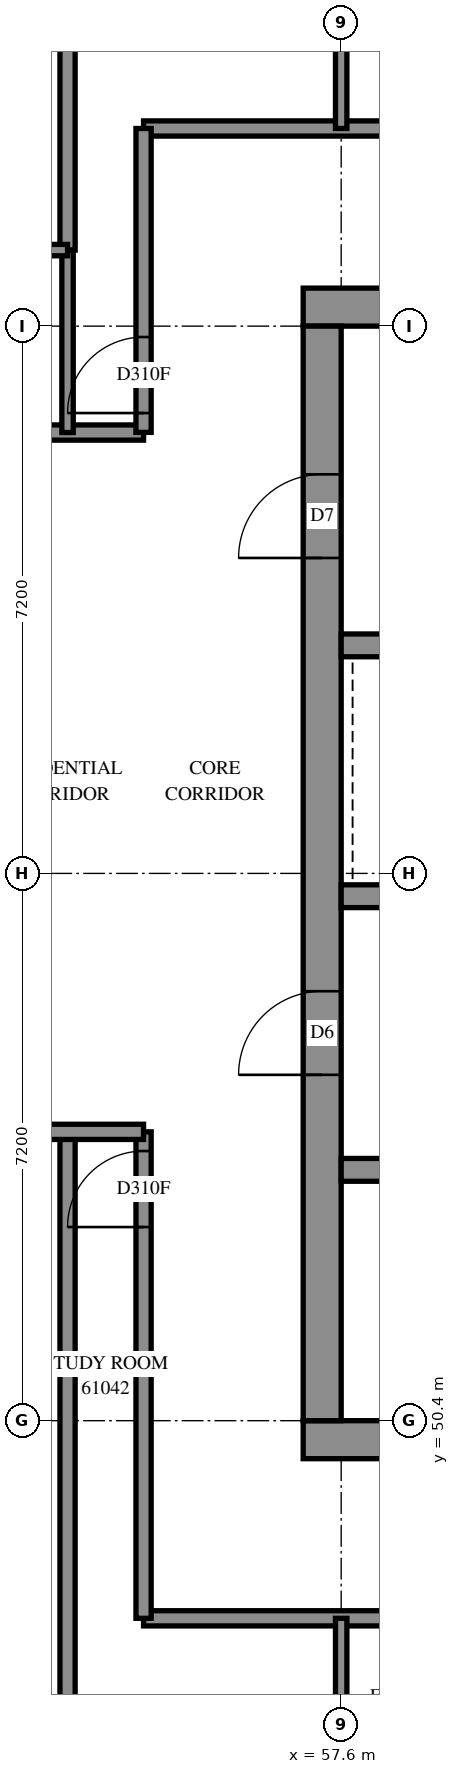
"""IFC4 building model, lengths in metres.
Left out: names, types, materials, properties, quantities, classifications, styles, units other than length and angle.
Written with IfcOpenShell. Run it as: python <this file> out.ifc"""

import sys

from ifc_helpers import new_model, si_unit, direction, frame, frame_2d, origin, place, context, subcontext, project, spatial, rectangle, extrude, element, fill, save


model = new_model("IFC4")
c1 = context("Model", 3, precision=1e-05, world=origin(), true_north=direction((0.0, 1.0)))
c2 = subcontext(c1, "Body", "Model", "MODEL_VIEW")
j1 = project(units=[si_unit("LENGTHUNIT", "METRE"), si_unit("PLANEANGLEUNIT", "RADIAN")], contexts=[c1])
p1 = place(None, origin())
s1 = spatial("IfcSite", under=j1, at=p1, CompositionType="ELEMENT")
p2 = place(p1, origin())
s2 = spatial("IfcBuilding", under=s1, at=p2, CompositionType="ELEMENT")
p3 = place(p2, frame((0.0, 0.0, 223.6)))
s3 = spatial("IfcBuildingStorey", under=s2, at=p3, CompositionType="ELEMENT", Elevation=223.6)
p4 = place(p3, frame((57.1, 50.15, -0.3), z_axis=(0.0, 0.0, 1.0), x_axis=(1.0, 0.0, 0.0)))
e1 = element("IfcWall", 1, at=p4, inside=s3, PredefinedType="SHEAR", context=c2, shape_type="SweptSolid", body=[
    extrude(rectangle(XDim=15.4, YDim=0.5, at=frame_2d((7.7, 0.0))), origin(), (0.0, 0.0, 1.0), 2.7),
])
p5 = place(p3, frame((57.1, 65.05, -0.3), z_axis=(0.0, 0.0, 1.0), x_axis=(1.0, 0.0, 0.0)))
e2 = element("IfcWall", 2, at=p5, inside=s3, PredefinedType="SHEAR", context=c2, shape_type="SweptSolid", body=[
    extrude(rectangle(XDim=15.4, YDim=0.5, at=frame_2d((7.7, 0.0))), origin(), (0.0, 0.0, 1.0), 2.7),
])
p6 = place(p5, frame((10.5, 0.0, 0.3)))
e3 = element("IfcOpeningElement", 3, at=p6, cuts=e2, PredefinedType="OPENING", context=c2, shape_type="SweptSolid", body=[
    extrude(rectangle(XDim=0.8, YDim=2.1, at=frame_2d((0.4, 1.05))), frame((0.0, 0.26, 0.0), z_axis=(0.0, -1.0, 0.0), x_axis=(1.0, 0.0, 0.0)), (0.0, 0.0, 1.0), 0.52),
])
p7 = place(p3, frame((57.35, 50.4, -0.3), z_axis=(0.0, 0.0, 1.0), x_axis=(0.0, 1.0, 0.0)))
e4 = element("IfcWall", 4, at=p7, inside=s3, PredefinedType="SHEAR", context=c2, shape_type="SweptSolid", body=[
    extrude(rectangle(XDim=14.4, YDim=0.5, at=frame_2d((7.2, 0.0))), origin(), (0.0, 0.0, 1.0), 2.7),
])
p8 = place(p7, frame((4.55, 0.0, 0.3)))
e5 = element("IfcOpeningElement", 5, at=p8, cuts=e4, PredefinedType="OPENING", context=c2, shape_type="SweptSolid", body=[
    extrude(rectangle(XDim=1.1, YDim=2.1, at=frame_2d((0.55, 1.05))), frame((0.0, 0.26, 0.0), z_axis=(0.0, -1.0, 0.0), x_axis=(1.0, 0.0, 0.0)), (0.0, 0.0, 1.0), 0.52),
])
p9 = place(p7, frame((11.35, 0.0, 0.3)))
e6 = element("IfcOpeningElement", 6, at=p9, cuts=e4, PredefinedType="OPENING", context=c2, shape_type="SweptSolid", body=[
    extrude(rectangle(XDim=1.1, YDim=2.1, at=frame_2d((0.55, 1.05))), frame((0.0, 0.26, 0.0), z_axis=(0.0, -1.0, 0.0), x_axis=(1.0, 0.0, 0.0)), (0.0, 0.0, 1.0), 0.52),
])
p10 = place(p3, frame((57.6, 53.7, 0.0), z_axis=(0.0, 0.0, 1.0), x_axis=(1.0, 0.0, 0.0)))
e7 = element("IfcWall", 7, at=p10, inside=s3, PredefinedType="SOLIDWALL", context=c2, shape_type="SweptSolid", body=[
    extrude(rectangle(XDim=14.4, YDim=0.3, at=frame_2d((7.2, 0.0))), origin(), (0.0, 0.0, 1.0), 3.1),
])
p11 = place(p10, frame((1.35, 0.0, 0.0)))
e8 = element("IfcOpeningElement", 8, at=p11, cuts=e7, PredefinedType="OPENING", context=c2, shape_type="SweptSolid", body=[
    extrude(rectangle(XDim=0.9, YDim=2.1, at=frame_2d((0.45, 1.05))), frame((0.0, 0.16, 0.0), z_axis=(0.0, -1.0, 0.0), x_axis=(1.0, 0.0, 0.0)), (0.0, 0.0, 1.0), 0.32),
])
p12 = place(p10, frame((4.95, 0.0, 0.0)))
e9 = element("IfcOpeningElement", 9, at=p12, cuts=e7, PredefinedType="OPENING", context=c2, shape_type="SweptSolid", body=[
    extrude(rectangle(XDim=0.9, YDim=2.1, at=frame_2d((0.45, 1.05))), frame((0.0, 0.16, 0.0), z_axis=(0.0, -1.0, 0.0), x_axis=(1.0, 0.0, 0.0)), (0.0, 0.0, 1.0), 0.32),
])
p13 = place(p10, frame((8.55, 0.0, 0.0)))
e10 = element("IfcOpeningElement", 10, at=p13, cuts=e7, PredefinedType="OPENING", context=c2, shape_type="SweptSolid", body=[
    extrude(rectangle(XDim=0.9, YDim=2.1, at=frame_2d((0.45, 1.05))), frame((0.0, 0.16, 0.0), z_axis=(0.0, -1.0, 0.0), x_axis=(1.0, 0.0, 0.0)), (0.0, 0.0, 1.0), 0.32),
])
p14 = place(p10, frame((12.05, 0.0, 0.0)))
e11 = element("IfcOpeningElement", 11, at=p14, cuts=e7, PredefinedType="OPENING", context=c2, shape_type="SweptSolid", body=[
    extrude(rectangle(XDim=1.1, YDim=2.1, at=frame_2d((0.55, 1.05))), frame((0.0, 0.16, 0.0), z_axis=(0.0, -1.0, 0.0), x_axis=(1.0, 0.0, 0.0)), (0.0, 0.0, 1.0), 0.32),
])
p15 = place(p3, frame((57.6, 57.3, 0.0), z_axis=(0.0, 0.0, 1.0), x_axis=(1.0, 0.0, 0.0)))
e12 = element("IfcWall", 12, at=p15, inside=s3, PredefinedType="SOLIDWALL", context=c2, shape_type="SweptSolid", body=[
    extrude(rectangle(XDim=14.4, YDim=0.3, at=frame_2d((7.2, 0.0))), origin(), (0.0, 0.0, 1.0), 3.1),
])
p16 = place(p15, frame((1.25, 0.0, 0.0)))
e13 = element("IfcOpeningElement", 13, at=p16, cuts=e12, PredefinedType="OPENING", context=c2, shape_type="SweptSolid", body=[
    extrude(rectangle(XDim=1.1, YDim=2.1, at=frame_2d((0.55, 1.05))), frame((0.0, 0.16, 0.0), z_axis=(0.0, -1.0, 0.0), x_axis=(1.0, 0.0, 0.0)), (0.0, 0.0, 1.0), 0.32),
])
p17 = place(p15, frame((4.85, 0.0, 0.0)))
e14 = element("IfcOpeningElement", 14, at=p17, cuts=e12, PredefinedType="OPENING", context=c2, shape_type="SweptSolid", body=[
    extrude(rectangle(XDim=1.1, YDim=2.1, at=frame_2d((0.55, 1.05))), frame((0.0, 0.16, 0.0), z_axis=(0.0, -1.0, 0.0), x_axis=(1.0, 0.0, 0.0)), (0.0, 0.0, 1.0), 0.32),
])
p18 = place(p15, frame((8.45, 0.0, 0.0)))
e15 = element("IfcOpeningElement", 15, at=p18, cuts=e12, PredefinedType="OPENING", context=c2, shape_type="SweptSolid", body=[
    extrude(rectangle(XDim=1.1, YDim=2.1, at=frame_2d((0.55, 1.05))), frame((0.0, 0.16, 0.0), z_axis=(0.0, -1.0, 0.0), x_axis=(1.0, 0.0, 0.0)), (0.0, 0.0, 1.0), 0.32),
])
p19 = place(p15, frame((12.05, 0.0, 0.0)))
e16 = element("IfcOpeningElement", 16, at=p19, cuts=e12, PredefinedType="OPENING", context=c2, shape_type="SweptSolid", body=[
    extrude(rectangle(XDim=1.1, YDim=2.1, at=frame_2d((0.55, 1.05))), frame((0.0, 0.16, 0.0), z_axis=(0.0, -1.0, 0.0), x_axis=(1.0, 0.0, 0.0)), (0.0, 0.0, 1.0), 0.32),
])
p20 = place(p3, frame((57.6, 60.6, 0.0), z_axis=(0.0, 0.0, 1.0), x_axis=(1.0, 0.0, 0.0)))
e17 = element("IfcWall", 17, at=p20, inside=s3, PredefinedType="SOLIDWALL", context=c2, shape_type="SweptSolid", body=[
    extrude(rectangle(XDim=7.2, YDim=0.3, at=frame_2d((3.6, 0.0))), origin(), (0.0, 0.0, 1.0), 3.1),
])
p21 = place(p3, frame((55.0, 67.4, 0.0), z_axis=(0.0, 0.0, 1.0), x_axis=(1.0, 0.0, 0.0)))
e18 = element("IfcWall", 18, at=p21, inside=s3, PredefinedType="PARTITIONING", context=c2, shape_type="SweptSolid", body=[
    extrude(rectangle(XDim=19.6, YDim=0.2, at=frame_2d((9.8, 0.0))), origin(), (0.0, 0.0, 1.0), 3.1),
])
p22 = place(p21, frame((4.9, 0.0, 0.0)))
e19 = element("IfcOpeningElement", 19, at=p22, cuts=e18, PredefinedType="OPENING", context=c2, shape_type="SweptSolid", body=[
    extrude(rectangle(XDim=0.9, YDim=2.1, at=frame_2d((0.45, 1.05))), frame((0.0, 0.11, 0.0), z_axis=(0.0, -1.0, 0.0), x_axis=(1.0, 0.0, 0.0)), (0.0, 0.0, 1.0), 0.22),
])
p23 = place(p21, frame((6.6, 0.0, 0.0)))
e20 = element("IfcOpeningElement", 20, at=p23, cuts=e18, PredefinedType="OPENING", context=c2, shape_type="SweptSolid", body=[
    extrude(rectangle(XDim=0.9, YDim=2.1, at=frame_2d((0.45, 1.05))), frame((0.0, 0.11, 0.0), z_axis=(0.0, -1.0, 0.0), x_axis=(1.0, 0.0, 0.0)), (0.0, 0.0, 1.0), 0.22),
])
p24 = place(p21, frame((14.001, 0.0, 0.0)))
e21 = element("IfcOpeningElement", 21, at=p24, cuts=e18, PredefinedType="OPENING", context=c2, shape_type="SweptSolid", body=[
    extrude(rectangle(XDim=0.9, YDim=2.1, at=frame_2d((0.45, 1.05))), frame((0.0, 0.11, 0.0), z_axis=(0.0, -1.0, 0.0), x_axis=(1.0, 0.0, 0.0)), (0.0, 0.0, 1.0), 0.22),
])
p25 = place(p3, frame((55.0, 47.8, 0.0), z_axis=(0.0, 0.0, 1.0), x_axis=(1.0, 0.0, 0.0)))
e22 = element("IfcWall", 22, at=p25, inside=s3, PredefinedType="PARTITIONING", context=c2, shape_type="SweptSolid", body=[
    extrude(rectangle(XDim=19.266, YDim=0.2, at=frame_2d((9.633, 0.0))), origin(), (0.0, 0.0, 1.0), 3.1),
])
p26 = place(p25, frame((4.9, 0.0, 0.0)))
e23 = element("IfcOpeningElement", 23, at=p26, cuts=e22, PredefinedType="OPENING", context=c2, shape_type="SweptSolid", body=[
    extrude(rectangle(XDim=0.9, YDim=2.1, at=frame_2d((0.45, 1.05))), frame((0.0, 0.11, 0.0), z_axis=(0.0, -1.0, 0.0), x_axis=(1.0, 0.0, 0.0)), (0.0, 0.0, 1.0), 0.22),
])
p27 = place(p25, frame((6.6, 0.0, 0.0)))
e24 = element("IfcOpeningElement", 24, at=p27, cuts=e22, PredefinedType="OPENING", context=c2, shape_type="SweptSolid", body=[
    extrude(rectangle(XDim=0.9, YDim=2.1, at=frame_2d((0.45, 1.05))), frame((0.0, 0.11, 0.0), z_axis=(0.0, -1.0, 0.0), x_axis=(1.0, 0.0, 0.0)), (0.0, 0.0, 1.0), 0.22),
])
p28 = place(p25, frame((13.661, 0.0, 0.0)))
e25 = element("IfcOpeningElement", 25, at=p28, cuts=e22, PredefinedType="OPENING", context=c2, shape_type="SweptSolid", body=[
    extrude(rectangle(XDim=0.9, YDim=2.1, at=frame_2d((0.45, 1.05))), frame((0.0, 0.11, 0.0), z_axis=(0.0, -1.0, 0.0), x_axis=(1.0, 0.0, 0.0)), (0.0, 0.0, 1.0), 0.22),
])
p29 = place(p3, frame((40.602, 63.4, 0.0), z_axis=(0.0, 0.0, 1.0), x_axis=(1.0, 0.0, 0.0)))
e26 = element("IfcWall", 26, at=p29, inside=s3, PredefinedType="PARTITIONING", context=c2, shape_type="SweptSolid", body=[
    extrude(rectangle(XDim=14.398, YDim=0.2, at=frame_2d((7.199, 0.0))), origin(), (0.0, 0.0, 1.0), 3.1),
])
p30 = place(p29, frame((2.998, 0.0, 0.0)))
e27 = element("IfcOpeningElement", 27, at=p30, cuts=e26, PredefinedType="OPENING", context=c2, shape_type="SweptSolid", body=[
    extrude(rectangle(XDim=0.9, YDim=2.1, at=frame_2d((0.45, 1.05))), frame((0.0, 0.11, 0.0), z_axis=(0.0, -1.0, 0.0), x_axis=(1.0, 0.0, 0.0)), (0.0, 0.0, 1.0), 0.22),
])
p31 = place(p29, frame((8.498, 0.0, 0.0)))
e28 = element("IfcOpeningElement", 28, at=p31, cuts=e26, PredefinedType="OPENING", context=c2, shape_type="SweptSolid", body=[
    extrude(rectangle(XDim=0.9, YDim=2.1, at=frame_2d((0.45, 1.05))), frame((0.0, 0.11, 0.0), z_axis=(0.0, -1.0, 0.0), x_axis=(1.0, 0.0, 0.0)), (0.0, 0.0, 1.0), 0.22),
])
p32 = place(p29, frame((10.198, 0.0, 0.0)))
e29 = element("IfcOpeningElement", 29, at=p32, cuts=e26, PredefinedType="OPENING", context=c2, shape_type="SweptSolid", body=[
    extrude(rectangle(XDim=0.9, YDim=2.1, at=frame_2d((0.45, 1.05))), frame((0.0, 0.11, 0.0), z_axis=(0.0, -1.0, 0.0), x_axis=(1.0, 0.0, 0.0)), (0.0, 0.0, 1.0), 0.22),
])
p33 = place(p3, frame((54.0, 42.31, 0.0), z_axis=(0.0, 0.0, 1.0), x_axis=(0.0, 1.0, 0.0)))
e30 = element("IfcWall", 30, at=p33, inside=s3, PredefinedType="PARTITIONING", context=c2, shape_type="SweptSolid", body=[
    extrude(rectangle(XDim=11.89, YDim=0.2, at=frame_2d((5.945, 0.0))), origin(), (0.0, 0.0, 1.0), 3.1),
])
p34 = place(p3, frame((54.0, 65.8, 0.0), z_axis=(0.0, 0.0, 1.0), x_axis=(0.0, 1.0, 0.0)))
e31 = element("IfcWall", 31, at=p34, inside=s3, PredefinedType="PARTITIONING", context=c2, shape_type="SweptSolid", body=[
    extrude(rectangle(XDim=7.004, YDim=0.2, at=frame_2d((3.502, 0.0))), origin(), (0.0, 0.0, 1.0), 3.1),
])
p35 = place(p3, frame((55.0, 47.8, 0.0), z_axis=(0.0, 0.0, 1.0), x_axis=(0.0, 1.0, 0.0)))
e32 = element("IfcWall", 32, at=p35, inside=s3, PredefinedType="PARTITIONING", context=c2, shape_type="SweptSolid", body=[
    extrude(rectangle(XDim=6.4, YDim=0.2, at=frame_2d((3.2, 0.0))), origin(), (0.0, 0.0, 1.0), 3.1),
])
p36 = place(p35, frame((5.147, 0.0, 0.0)))
e33 = element("IfcOpeningElement", 33, at=p36, cuts=e32, PredefinedType="OPENING", context=c2, shape_type="SweptSolid", body=[
    extrude(rectangle(XDim=1.0, YDim=2.1, at=frame_2d((0.5, 1.05))), frame((0.0, 0.11, 0.0), z_axis=(0.0, -1.0, 0.0), x_axis=(1.0, 0.0, 0.0)), (0.0, 0.0, 1.0), 0.22),
])
p37 = place(p3, frame((50.4, 54.2, 0.0), z_axis=(0.0, 0.0, 1.0), x_axis=(1.0, 0.0, 0.0)))
e34 = element("IfcWall", 34, at=p37, inside=s3, PredefinedType="PARTITIONING", context=c2, shape_type="SweptSolid", body=[
    extrude(rectangle(XDim=4.6, YDim=0.2, at=frame_2d((2.3, 0.0))), origin(), (0.0, 0.0, 1.0), 3.1),
])
p38 = place(p37, frame((2.3, 0.0, 0.0)))
e35 = element("IfcOpeningElement", 35, at=p38, cuts=e34, PredefinedType="OPENING", context=c2, shape_type="SweptSolid", body=[
    extrude(rectangle(XDim=0.9, YDim=2.1, at=frame_2d((0.45, 1.05))), frame((0.0, 0.11, 0.0), z_axis=(0.0, -1.0, 0.0), x_axis=(1.0, 0.0, 0.0)), (0.0, 0.0, 1.0), 0.22),
])
p39 = place(p3, frame((55.0, 63.402, 0.0), z_axis=(0.0, 0.0, 1.0), x_axis=(0.0, 1.0, 0.0)))
e36 = element("IfcWall", 36, at=p39, inside=s3, PredefinedType="PARTITIONING", context=c2, shape_type="SweptSolid", body=[
    extrude(rectangle(XDim=3.998, YDim=0.2, at=frame_2d((1.999, 0.0))), origin(), (0.0, 0.0, 1.0), 3.1),
])
p40 = place(p39, frame((0.255, 0.0, 0.0)))
e37 = element("IfcOpeningElement", 37, at=p40, cuts=e36, PredefinedType="OPENING", context=c2, shape_type="SweptSolid", body=[
    extrude(rectangle(XDim=1.0, YDim=2.1, at=frame_2d((0.5, 1.05))), frame((0.0, 0.11, 0.0), z_axis=(0.0, -1.0, 0.0), x_axis=(1.0, 0.0, 0.0)), (0.0, 0.0, 1.0), 0.22),
])
for number, where, z_axis, x_axis in (
    (38, (54.0, 63.4, 0.0), (0.0, 0.0, 1.0), (0.0, 1.0, 0.0)),
    (39, (57.6, 45.4, 0.0), (0.0, 0.0, 1.0), (0.0, 1.0, 0.0)),
    (40, (57.6, 67.4, 0.0), (0.0, 0.0, 1.0), (0.0, 1.0, 0.0)),
):
    element("IfcWall", number, at=place(p3, frame(where, z_axis=z_axis, x_axis=x_axis)), inside=s3, PredefinedType="PARTITIONING", context=c2, shape_type="SweptSolid", body=[
        extrude(rectangle(XDim=2.4, YDim=0.15, at=frame_2d((1.2, 0.0))), origin(), (0.0, 0.0, 1.0), 3.1),
    ])
p41 = place(p3, frame((52.1, 65.8, 0.0), z_axis=(0.0, 0.0, 1.0), x_axis=(1.0, 0.0, 0.0)))
e41 = element("IfcWall", 41, at=p41, inside=s3, PredefinedType="PARTITIONING", context=c2, shape_type="SweptSolid", body=[
    extrude(rectangle(XDim=1.9, YDim=0.15, at=frame_2d((0.95, 0.0))), origin(), (0.0, 0.0, 1.0), 3.1),
])
p42 = place(p41, frame((0.493, 0.0, 0.0)))
e42 = element("IfcOpeningElement", 42, at=p42, cuts=e41, PredefinedType="OPENING", context=c2, shape_type="SweptSolid", body=[
    extrude(rectangle(XDim=0.8, YDim=2.1, at=frame_2d((0.4, 1.05))), frame((0.0, 0.085, 0.0), z_axis=(0.0, -1.0, 0.0), x_axis=(1.0, 0.0, 0.0)), (0.0, 0.0, 1.0), 0.17),
])
p43 = place(p8, origin())
e43 = element("IfcDoor", 43, at=p43, inside=s3, OperationType="DOUBLE_DOOR_SINGLE_SWING", PredefinedType="DOOR", context=c2, shape_type="SweptSolid", body=[
    extrude(rectangle(XDim=1.1, YDim=2.1, at=frame_2d((0.55, 1.05))), frame((0.0, 0.025, 0.0), z_axis=(0.0, -1.0, 0.0), x_axis=(1.0, 0.0, 0.0)), (0.0, 0.0, 1.0), 0.05),
])
fill(e5, e43)
p44 = place(p9, origin())
e44 = element("IfcDoor", 44, at=p44, inside=s3, OperationType="SINGLE_SWING_LEFT", PredefinedType="DOOR", context=c2, shape_type="SweptSolid", body=[
    extrude(rectangle(XDim=1.1, YDim=2.1, at=frame_2d((0.55, 1.05))), frame((0.0, 0.025, 0.0), z_axis=(0.0, -1.0, 0.0), x_axis=(1.0, 0.0, 0.0)), (0.0, 0.0, 1.0), 0.05),
])
fill(e6, e44)
p45 = place(p40, origin())
e45 = element("IfcDoor", 45, at=p45, inside=s3, OperationType="SINGLE_SWING_LEFT", PredefinedType="DOOR", context=c2, shape_type="SweptSolid", body=[
    extrude(rectangle(XDim=1.0, YDim=2.1, at=frame_2d((0.5, 1.05))), frame((0.0, 0.025, 0.0), z_axis=(0.0, -1.0, 0.0), x_axis=(1.0, 0.0, 0.0)), (0.0, 0.0, 1.0), 0.05),
])
fill(e37, e45)
p46 = place(p36, origin())
e46 = element("IfcDoor", 46, at=p46, inside=s3, OperationType="SINGLE_SWING_RIGHT", PredefinedType="DOOR", context=c2, shape_type="SweptSolid", body=[
    extrude(rectangle(XDim=1.0, YDim=2.1, at=frame_2d((0.5, 1.05))), frame((0.0, 0.025, 0.0), z_axis=(0.0, -1.0, 0.0), x_axis=(1.0, 0.0, 0.0)), (0.0, 0.0, 1.0), 0.05),
])
fill(e33, e46)
save(model, sys.argv[1])
